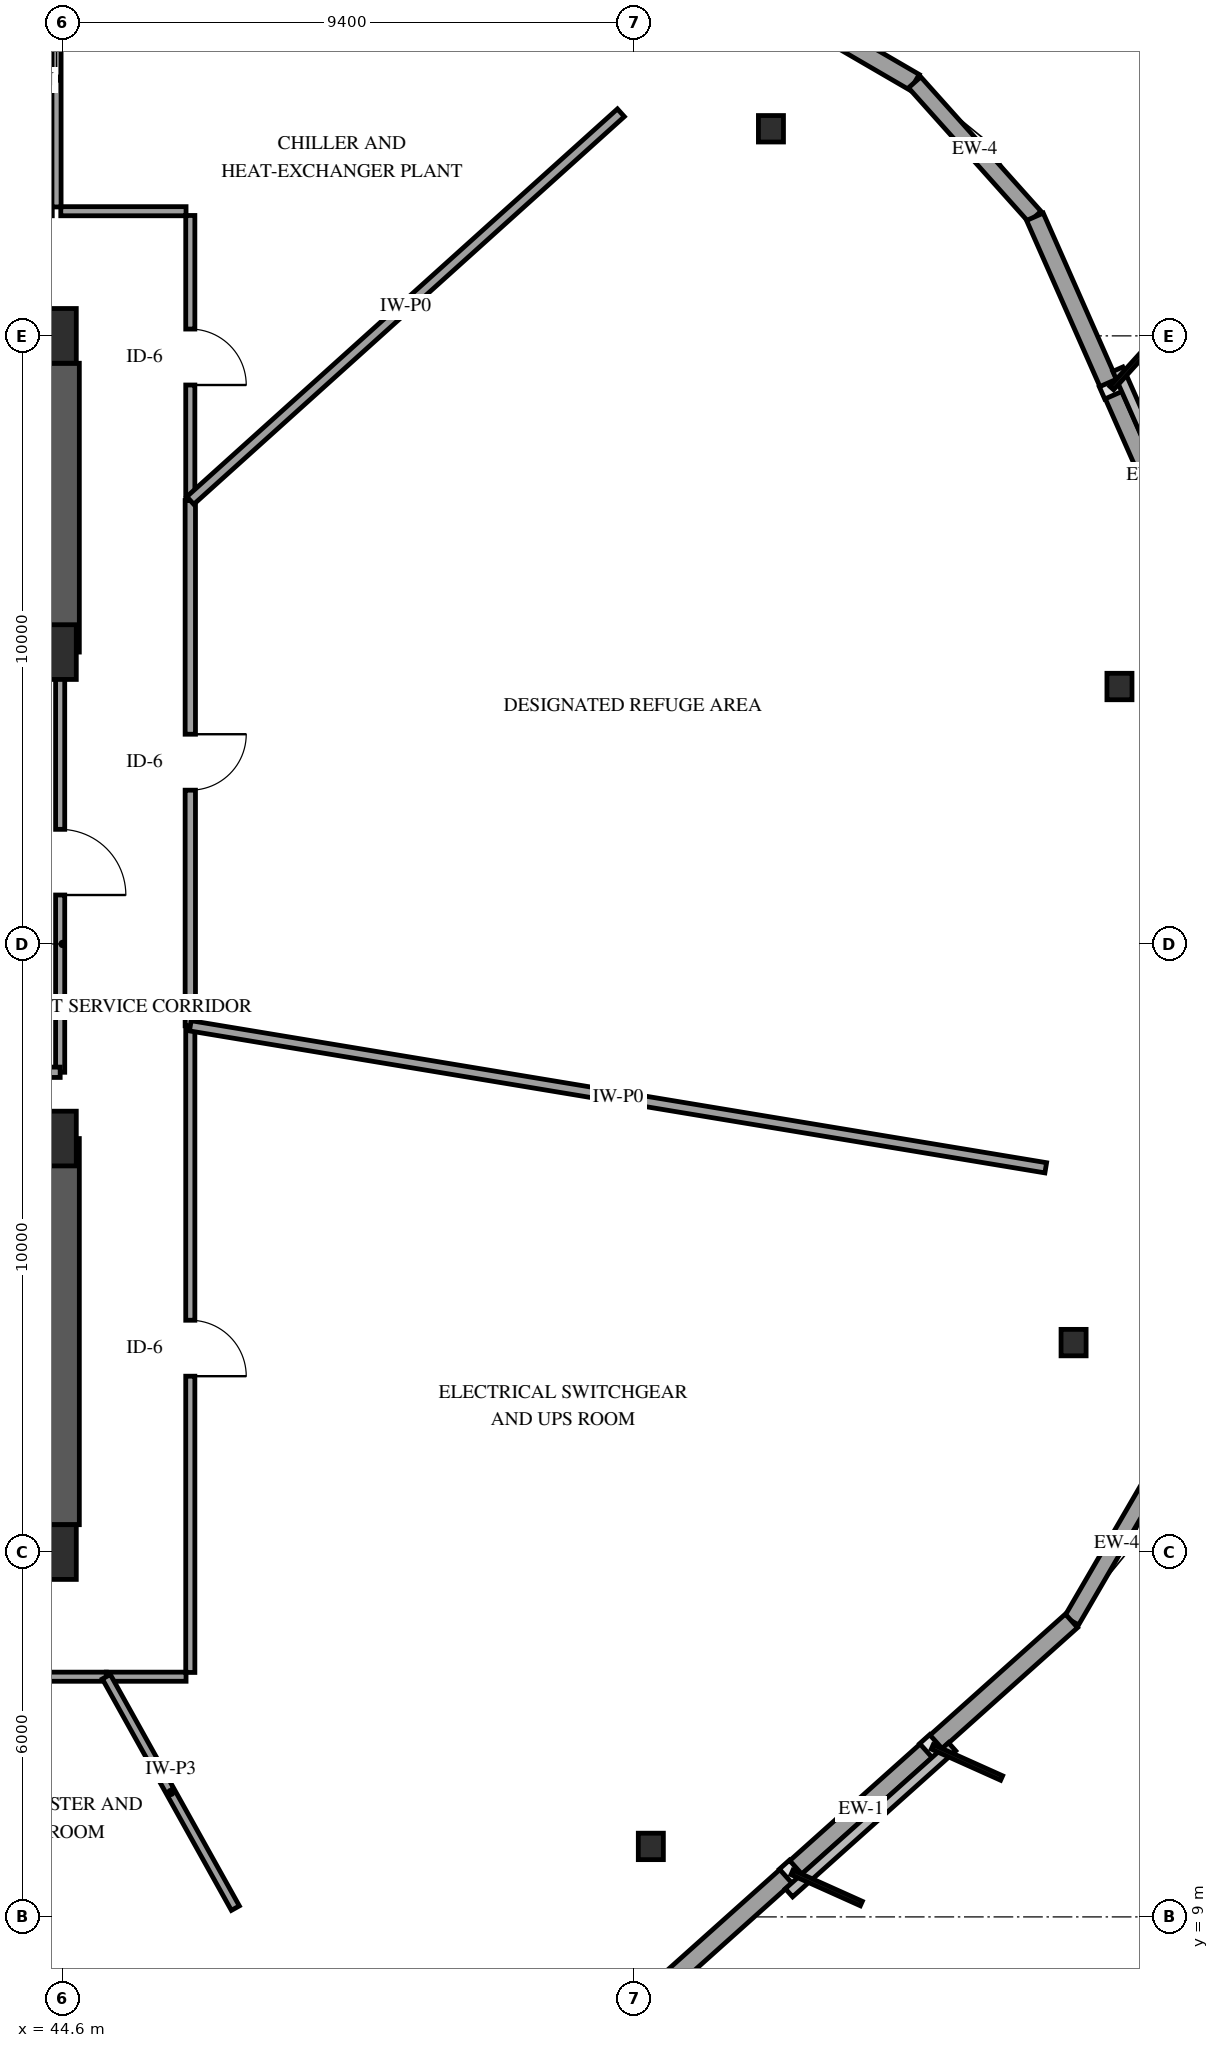
"""IFC4 building model, lengths in metres.
Left out: names, types, materials, properties, quantities, classifications, styles, units other than length and angle.
Written with IfcOpenShell. Run it as: python <this file> out.ifc"""

import sys

from ifc_helpers import new_model, si_unit, direction, frame, frame_2d, origin, origin_2d, place, context, subcontext, project, spatial, rectangle, i_section, extrude, element, fill, save


model = new_model("IFC4")
c1 = context("Model", 3, precision=1e-05, world=origin(), true_north=direction((0.0, 1.0)))
c2 = subcontext(c1, "Body", "Model", "MODEL_VIEW")
j1 = project(units=[si_unit("LENGTHUNIT", "METRE"), si_unit("PLANEANGLEUNIT", "RADIAN")], contexts=[c1])
p1 = place(None, origin())
s1 = spatial("IfcSite", under=j1, at=p1, CompositionType="ELEMENT")
p2 = place(p1, origin())
s2 = spatial("IfcBuilding", under=s1, at=p2, CompositionType="ELEMENT")
p3 = place(p2, frame((0.0, 0.0, 185.8)))
s3 = spatial("IfcBuildingStorey", under=s2, at=p3, CompositionType="ELEMENT", Elevation=185.8)
p4 = place(p3, frame((44.6, 15.45, 0.0), z_axis=(0.0, 0.0, 1.0), x_axis=(0.0, 1.0, 0.0)))
e1 = element("IfcWall", 1, at=p4, inside=s3, PredefinedType="SHEAR", context=c2, shape_type="SweptSolid", body=[
    extrude(rectangle(XDim=6.35, YDim=0.55, at=frame_2d((3.175, 0.0))), origin(), (0.0, 0.0, 1.0), 4.8),
])
p5 = place(p3, frame((44.6, 29.8, 0.0), z_axis=(0.0, 0.0, 1.0), x_axis=(0.0, 1.0, 0.0)))
e2 = element("IfcWall", 2, at=p5, inside=s3, PredefinedType="SHEAR", context=c2, shape_type="SweptSolid", body=[
    extrude(rectangle(XDim=4.75, YDim=0.55, at=frame_2d((2.375, 0.0))), origin(), (0.0, 0.0, 1.0), 4.8),
])
for number, where, z_axis, x_axis in (
    (3, (44.6, 15.0, 0.0), (0.0, 0.0, 1.0), (1.0, 0.0, 0.0)),
    (4, (44.6, 21.8, 0.0), (0.0, 0.0, 1.0), (1.0, 0.0, 0.0)),
    (5, (44.6, 29.8, 0.0), (0.0, 0.0, 1.0), (1.0, 0.0, 0.0)),
    (6, (44.6, 35.0, 0.0), (0.0, 0.0, 1.0), (1.0, 0.0, 0.0)),
):
    element("IfcColumn", number, at=place(p3, frame(where, z_axis=z_axis, x_axis=x_axis)), inside=s3, PredefinedType="PILASTER", context=c2, shape_type="SweptSolid", body=[
        extrude(rectangle(XDim=0.45, YDim=0.9, at=origin_2d()), origin(), (0.0, 0.0, 1.0), 4.5),
    ])
for number, where, z_axis, x_axis in (
    (7, (61.98, 29.234, 0.0), (0.0, 0.0, 1.0), (1.0, 0.0, 0.0)),
    (8, (56.249, 38.406, 0.0), (0.0, 0.0, 1.0), (1.0, 0.0, 0.0)),
    (9, (54.274, 10.159, 0.0), (0.0, 0.0, 1.0), (1.0, 0.0, 0.0)),
    (10, (61.226, 18.444, 0.0), (0.0, 0.0, 1.0), (1.0, 0.0, 0.0)),
):
    element("IfcColumn", number, at=place(p3, frame(where, z_axis=z_axis, x_axis=x_axis)), inside=s3, PredefinedType="COLUMN", context=c2, shape_type="SweptSolid", body=[
        extrude(i_section(OverallWidth=0.412, OverallDepth=0.435, WebThickness=0.036, FlangeThickness=0.057, FilletRadius=0.038, at=origin_2d()), origin(), (0.0, 0.0, 1.0), 4.5),
    ])
p6 = place(p3, frame((58.612, 39.169, 0.0), z_axis=(0.0, 0.0, 1.0), x_axis=(-0.864445551727, 0.502726454544, 0.0)))
e11 = element("IfcWall", 11, at=p6, inside=s3, PredefinedType="SOLIDWALL", context=c2, shape_type="SweptSolid", body=[
    extrude(rectangle(XDim=9.287, YDim=0.3, at=frame_2d((4.644, 0.0))), origin(), (0.0, 0.0, 1.0), 3.879),
])
p7 = place(p3, frame((61.191, 13.868, 0.0), z_axis=(0.0, 0.0, 1.0), x_axis=(0.502683394624, 0.864470592195, 0.0)))
e12 = element("IfcWall", 12, at=p7, inside=s3, PredefinedType="SOLIDWALL", context=c2, shape_type="SweptSolid", body=[
    extrude(rectangle(XDim=2.967, YDim=0.27, at=frame_2d((1.483, 0.0))), origin(), (0.0, 0.0, 1.0), 3.879),
])
p8 = place(p3, frame((54.27, 7.676, 0.0), z_axis=(0.0, 0.0, 1.0), x_axis=(0.745239938456, 0.666796396308, 0.0)))
e13 = element("IfcWall", 13, at=p8, inside=s3, PredefinedType="SOLIDWALL", context=c2, shape_type="SweptSolid", body=[
    extrude(rectangle(XDim=9.287, YDim=0.3, at=frame_2d((4.644, 0.0))), origin(), (0.0, 0.0, 1.0), 3.879),
])
p9 = place(p3, frame((60.59, 36.958, 0.0), z_axis=(0.0, 0.0, 1.0), x_axis=(-0.666802076596, 0.745234856033, 0.0)))
e14 = element("IfcWall", 14, at=p9, inside=s3, PredefinedType="SOLIDWALL", context=c2, shape_type="SweptSolid", body=[
    extrude(rectangle(XDim=2.967, YDim=0.27, at=frame_2d((1.483, 0.0))), origin(), (0.0, 0.0, 1.0), 3.879),
])
p10 = place(p3, frame((64.341, 28.462, 0.0), z_axis=(0.0, 0.0, 1.0), x_axis=(-0.403883538706, 0.914810410502, 0.0)))
e15 = element("IfcWall", 15, at=p10, inside=s3, PredefinedType="SOLIDWALL", context=c2, shape_type="SweptSolid", body=[
    extrude(rectangle(XDim=9.287, YDim=0.3, at=frame_2d((4.644, 0.0))), origin(), (0.0, 0.0, 1.0), 3.879),
])
p11 = place(p3, frame((46.7, 23.654, 0.0), z_axis=(0.0, 0.0, 1.0), x_axis=(0.0, -1.0, 0.0)))
e16 = element("IfcWall", 16, at=p11, inside=s3, PredefinedType="PARTITIONING", context=c2, shape_type="SweptSolid", body=[
    extrude(rectangle(XDim=10.634, YDim=0.15, at=frame_2d((5.317, 0.0))), origin(), (0.0, 0.0, 1.0), 4.5),
])
p12 = place(p11, frame((4.842, 0.0, 0.0)))
e17 = element("IfcOpeningElement", 17, at=p12, cuts=e16, PredefinedType="OPENING", context=c2, shape_type="SweptSolid", body=[
    extrude(rectangle(XDim=0.92, YDim=2.12, at=frame_2d((0.46, 1.06))), frame((0.0, 0.085, 0.0), z_axis=(0.0, -1.0, 0.0), x_axis=(1.0, 0.0, 0.0)), (0.0, 0.0, 1.0), 0.17),
])
p13 = place(p3, frame((46.7, 32.293, 0.0), z_axis=(0.0, 0.0, 1.0), x_axis=(0.0, -1.0, 0.0)))
e18 = element("IfcWall", 18, at=p13, inside=s3, PredefinedType="PARTITIONING", context=c2, shape_type="SweptSolid", body=[
    extrude(rectangle(XDim=8.639, YDim=0.17, at=frame_2d((4.319, 0.0))), origin(), (0.0, 0.0, 1.0), 4.5),
])
p14 = place(p13, frame((3.844, 0.0, 0.0)))
e19 = element("IfcOpeningElement", 19, at=p14, cuts=e18, PredefinedType="OPENING", context=c2, shape_type="SweptSolid", body=[
    extrude(rectangle(XDim=0.92, YDim=2.12, at=frame_2d((0.46, 1.06))), frame((0.0, 0.095, 0.0), z_axis=(0.0, -1.0, 0.0), x_axis=(1.0, 0.0, 0.0)), (0.0, 0.0, 1.0), 0.19),
])
p15 = place(p3, frame((44.56, 29.8, 0.0), z_axis=(0.0, 0.0, 1.0), x_axis=(0.0, -1.0, 0.0)))
e20 = element("IfcWall", 20, at=p15, inside=s3, PredefinedType="PARTITIONING", context=c2, shape_type="SweptSolid", body=[
    extrude(rectangle(XDim=6.91, YDim=0.15, at=frame_2d((3.455, 0.0))), origin(), (0.0, 0.0, 1.0), 3.54),
])
p16 = place(p15, frame((2.915, 0.0, 0.0)))
e21 = element("IfcOpeningElement", 21, at=p16, cuts=e20, PredefinedType="OPENING", context=c2, shape_type="SweptSolid", body=[
    extrude(rectangle(XDim=1.08, YDim=2.15, at=frame_2d((0.54, 1.075))), frame((0.0, 0.085, 0.0), z_axis=(0.0, -1.0, 0.0), x_axis=(1.0, 0.0, 0.0)), (0.0, 0.0, 1.0), 0.17),
])
p17 = place(p3, frame((46.7, 36.98, 0.0), z_axis=(0.0, 0.0, 1.0), x_axis=(0.0, -1.0, 0.0)))
e22 = element("IfcWall", 22, at=p17, inside=s3, PredefinedType="PARTITIONING", context=c2, shape_type="SweptSolid", body=[
    extrude(rectangle(XDim=4.687, YDim=0.15, at=frame_2d((2.344, 0.0))), origin(), (0.0, 0.0, 1.0), 4.5),
])
p18 = place(p17, frame((1.868, 0.0, 0.0)))
e23 = element("IfcOpeningElement", 23, at=p18, cuts=e22, PredefinedType="OPENING", context=c2, shape_type="SweptSolid", body=[
    extrude(rectangle(XDim=0.92, YDim=2.12, at=frame_2d((0.46, 1.06))), frame((0.0, 0.085, 0.0), z_axis=(0.0, -1.0, 0.0), x_axis=(1.0, 0.0, 0.0)), (0.0, 0.0, 1.0), 0.17),
])
p19 = place(p3, frame((41.24, 22.89, 0.0), z_axis=(0.0, 0.0, 1.0), x_axis=(1.0, 0.0, 0.0)))
e24 = element("IfcWall", 24, at=p19, inside=s3, PredefinedType="PARTITIONING", context=c2, shape_type="SweptSolid", body=[
    extrude(rectangle(XDim=3.32, YDim=0.17, at=frame_2d((1.66, 0.0))), origin(), (0.0, 0.0, 1.0), 4.5),
])
p20 = place(p19, frame((1.12, 0.0, 0.0)))
e25 = element("IfcOpeningElement", 25, at=p20, cuts=e24, PredefinedType="OPENING", context=c2, shape_type="SweptSolid", body=[
    extrude(rectangle(XDim=1.08, YDim=2.15, at=frame_2d((0.54, 1.075))), frame((0.0, 0.095, 0.0), z_axis=(0.0, -1.0, 0.0), x_axis=(1.0, 0.0, 0.0)), (0.0, 0.0, 1.0), 0.19),
])
p21 = place(p3, frame((44.57, 37.05, 0.0), z_axis=(0.0, 0.0, 1.0), x_axis=(1.0, 0.0, 0.0)))
e26 = element("IfcWall", 26, at=p21, inside=s3, PredefinedType="PARTITIONING", context=c2, shape_type="SweptSolid", body=[
    extrude(rectangle(XDim=2.06, YDim=0.15, at=frame_2d((1.03, 0.0))), origin(), (0.0, 0.0, 1.0), 4.5),
])
p22 = place(p3, frame((46.63, 12.95, 0.0), z_axis=(0.0, 0.0, 1.0), x_axis=(-1.0, 0.0, 0.0)))
e27 = element("IfcWall", 27, at=p22, inside=s3, PredefinedType="PARTITIONING", context=c2, shape_type="SweptSolid", body=[
    extrude(rectangle(XDim=1.311, YDim=0.15, at=frame_2d((0.655, 0.0))), origin(), (0.0, 0.0, 1.0), 4.5),
])
p23 = place(p3, frame((60.768, 21.319, 0.0), z_axis=(0.0, 0.0, 1.0), x_axis=(-0.986504286451, 0.163735435427, 0.0)))
e28 = element("IfcWall", 28, at=p23, inside=s3, PredefinedType="PARTITIONING", context=c2, shape_type="SweptSolid", body=[
    extrude(rectangle(XDim=14.26, YDim=0.17, at=frame_2d((7.13, 0.0))), origin(), (0.0, 0.0, 1.0), 3.874),
])
p24 = place(p3, frame((45.319, 12.95, 0.0), z_axis=(0.0, 0.0, 1.0), x_axis=(-1.0, 0.0, 0.0)))
e29 = element("IfcWall", 29, at=p24, inside=s3, PredefinedType="PARTITIONING", context=c2, shape_type="SweptSolid", body=[
    extrude(rectangle(XDim=11.605, YDim=0.15, at=frame_2d((5.802, 0.0))), origin(), (0.0, 0.0, 1.0), 4.5),
])
p25 = place(p24, frame((5.378, 0.0, 0.0)))
e30 = element("IfcOpeningElement", 30, at=p25, cuts=e29, PredefinedType="OPENING", context=c2, shape_type="SweptSolid", body=[
    extrude(rectangle(XDim=0.85, YDim=2.1, at=frame_2d((0.425, 1.05))), frame((0.0, 0.085, 0.0), z_axis=(0.0, -1.0, 0.0), x_axis=(1.0, 0.0, 0.0)), (0.0, 0.0, 1.0), 0.17),
])
p26 = place(p3, frame((53.781, 38.669, 0.0), z_axis=(0.0, 0.0, 1.0), x_axis=(-0.743136147703, -0.669140243878, 0.0)))
e31 = element("IfcWall", 31, at=p26, inside=s3, PredefinedType="PARTITIONING", context=c2, shape_type="SweptSolid", body=[
    extrude(rectangle(XDim=9.529, YDim=0.17, at=frame_2d((4.764, 0.0))), origin(), (0.0, 0.0, 1.0), 2.57),
])
p27 = place(p3, frame((47.441, 9.144, 0.0), z_axis=(0.0, 0.0, 1.0), x_axis=(-0.48694585255, 0.873432159177, 0.0)))
e32 = element("IfcWall", 32, at=p27, inside=s3, PredefinedType="PARTITIONING", context=c2, shape_type="SweptSolid", body=[
    extrude(rectangle(XDim=4.357, YDim=0.15, at=frame_2d((2.179, 0.0))), origin(), (0.0, 0.0, 1.0), 3.874),
])
p28 = place(p3, frame((44.5, 41.341, 0.0), z_axis=(0.0, 0.0, 1.0), x_axis=(0.0, -1.0, 0.0)))
e33 = element("IfcWall", 33, at=p28, inside=s3, PredefinedType="PARTITIONING", context=c2, shape_type="SweptSolid", body=[
    extrude(rectangle(XDim=4.221, YDim=0.15, at=frame_2d((2.11, 0.0))), origin(), (0.0, 0.0, 1.0), 3.874),
])
p29 = place(p12, origin())
e34 = element("IfcDoor", 34, at=p29, inside=s3, OperationType="SINGLE_SWING_RIGHT", PredefinedType="DOOR", context=c2, shape_type="SweptSolid", body=[
    extrude(rectangle(XDim=0.92, YDim=2.12, at=frame_2d((0.46, 1.06))), frame((0.0, 0.025, 0.0), z_axis=(0.0, -1.0, 0.0), x_axis=(1.0, 0.0, 0.0)), (0.0, 0.0, 1.0), 0.05),
])
fill(e17, e34)
p30 = place(p14, origin())
e35 = element("IfcDoor", 35, at=p30, inside=s3, OperationType="SINGLE_SWING_LEFT", PredefinedType="DOOR", context=c2, shape_type="SweptSolid", body=[
    extrude(rectangle(XDim=0.92, YDim=2.12, at=frame_2d((0.46, 1.06))), frame((0.0, 0.025, 0.0), z_axis=(0.0, -1.0, 0.0), x_axis=(1.0, 0.0, 0.0)), (0.0, 0.0, 1.0), 0.05),
])
fill(e19, e35)
p31 = place(p16, origin())
e36 = element("IfcDoor", 36, at=p31, inside=s3, OperationType="SINGLE_SWING_RIGHT", PredefinedType="DOOR", context=c2, shape_type="SweptSolid", body=[
    extrude(rectangle(XDim=1.08, YDim=2.15, at=frame_2d((0.54, 1.075))), frame((0.0, 0.025, 0.0), z_axis=(0.0, -1.0, 0.0), x_axis=(1.0, 0.0, 0.0)), (0.0, 0.0, 1.0), 0.05),
])
fill(e21, e36)
p32 = place(p18, origin())
e37 = element("IfcDoor", 37, at=p32, inside=s3, OperationType="SINGLE_SWING_RIGHT", PredefinedType="DOOR", context=c2, shape_type="SweptSolid", body=[
    extrude(rectangle(XDim=0.92, YDim=2.12, at=frame_2d((0.46, 1.06))), frame((0.0, 0.025, 0.0), z_axis=(0.0, -1.0, 0.0), x_axis=(1.0, 0.0, 0.0)), (0.0, 0.0, 1.0), 0.05),
])
fill(e23, e37)
save(model, sys.argv[1])
